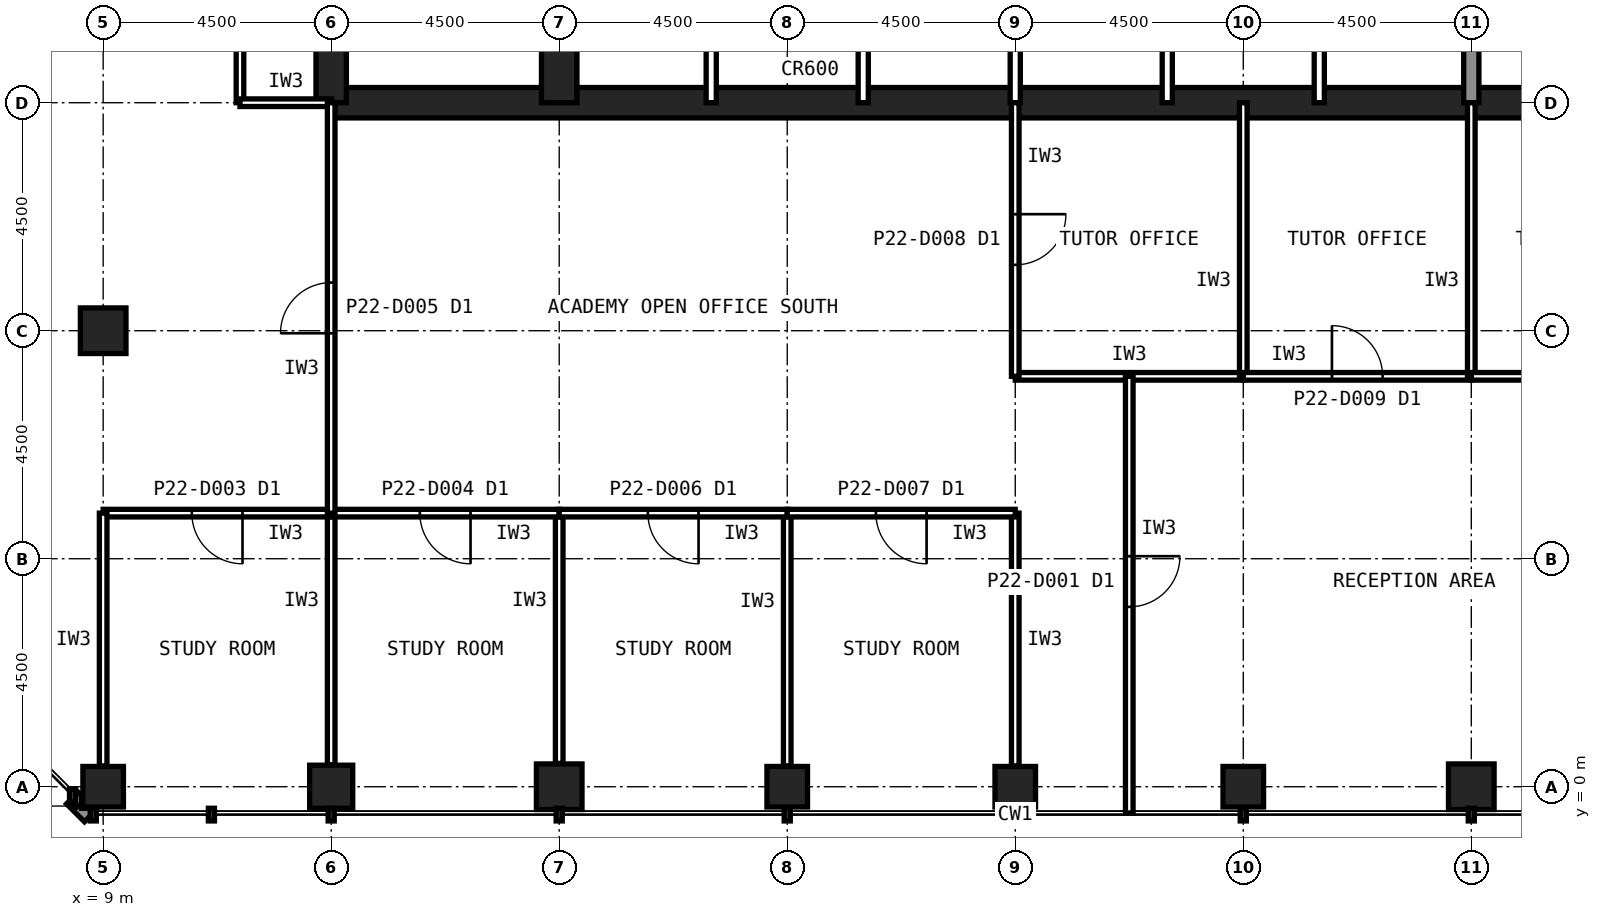
"""IFC4 building model, lengths in metres.
Left out: names, types, materials, properties, quantities, classifications, styles, units other than length and angle.
Written with IfcOpenShell. Run it as: python <this file> out.ifc"""

import sys

from ifc_helpers import new_model, si_unit, direction, frame, frame_2d, origin, origin_2d, place, context, subcontext, project, spatial, rectangle, hollow_rectangle, extrude, element, fill, save


model = new_model("IFC4")
c1 = context("Model", 3, precision=1e-05, world=origin(), true_north=direction((0.0, 1.0)))
c2 = subcontext(c1, "Body", "Model", "MODEL_VIEW")
j1 = project(units=[si_unit("LENGTHUNIT", "METRE"), si_unit("PLANEANGLEUNIT", "RADIAN")], contexts=[c1])
p1 = place(None, origin())
s1 = spatial("IfcSite", under=j1, at=p1, CompositionType="ELEMENT")
p2 = place(p1, origin())
s2 = spatial("IfcBuilding", under=s1, at=p2, CompositionType="ELEMENT")
p3 = place(p2, frame((0.0, 0.0, 96.2)))
s3 = spatial("IfcBuildingStorey", under=s2, at=p3, CompositionType="ELEMENT", Elevation=96.2)
p4 = place(p3, frame((9.0, 0.0, 0.0), z_axis=(0.0, 0.0, 1.0), x_axis=(1.0, 0.0, 0.0)))
e1 = element("IfcColumn", 1, at=p4, inside=s3, PredefinedType="COLUMN", context=c2, shape_type="SweptSolid", body=[
    extrude(hollow_rectangle(XDim=0.8, YDim=0.8, WallThickness=0.045, at=origin_2d()), origin(), (0.0, 0.0, 1.0), 4.2),
])
p5 = place(p3, frame((13.5, 0.0, 0.0), z_axis=(0.0, 0.0, 1.0), x_axis=(1.0, 0.0, 0.0)))
e2 = element("IfcColumn", 2, at=p5, inside=s3, PredefinedType="COLUMN", context=c2, shape_type="SweptSolid", body=[
    extrude(hollow_rectangle(XDim=0.85, YDim=0.85, WallThickness=0.05, at=origin_2d()), origin(), (0.0, 0.0, 1.0), 4.2),
])
p6 = place(p3, frame((18.0, 0.0, 0.0), z_axis=(0.0, 0.0, 1.0), x_axis=(1.0, 0.0, 0.0)))
e3 = element("IfcColumn", 3, at=p6, inside=s3, PredefinedType="COLUMN", context=c2, shape_type="SweptSolid", body=[
    extrude(hollow_rectangle(XDim=0.9, YDim=0.9, WallThickness=0.063, at=origin_2d()), origin(), (0.0, 0.0, 1.0), 4.2),
])
for number, where, z_axis, x_axis in (
    (4, (22.5, 0.0, 0.0), (0.0, 0.0, 1.0), (1.0, 0.0, 0.0)),
    (5, (27.0, 0.0, 0.0), (0.0, 0.0, 1.0), (1.0, 0.0, 0.0)),
    (6, (31.5, 0.0, 0.0), (0.0, 0.0, 1.0), (1.0, 0.0, 0.0)),
):
    element("IfcColumn", number, at=place(p3, frame(where, z_axis=z_axis, x_axis=x_axis)), inside=s3, PredefinedType="COLUMN", context=c2, shape_type="SweptSolid", body=[
        extrude(hollow_rectangle(XDim=0.8, YDim=0.8, WallThickness=0.045, at=origin_2d()), origin(), (0.0, 0.0, 1.0), 4.2),
    ])
for number, where, z_axis, x_axis in (
    (7, (36.0, 0.0, 0.0), (0.0, 0.0, 1.0), (1.0, 0.0, 0.0)),
    (8, (9.0, 9.0, 0.0), (0.0, 0.0, 1.0), (1.0, 0.0, 0.0)),
):
    element("IfcColumn", number, at=place(p3, frame(where, z_axis=z_axis, x_axis=x_axis)), inside=s3, PredefinedType="COLUMN", context=c2, shape_type="SweptSolid", body=[
        extrude(hollow_rectangle(XDim=0.9, YDim=0.9, WallThickness=0.063, at=origin_2d()), origin(), (0.0, 0.0, 1.0), 4.2),
    ])
p7 = place(p3, frame((13.5, 13.5, 0.0), z_axis=(0.0, 0.0, 1.0), x_axis=(1.0, 0.0, 0.0)))
e9 = element("IfcWall", 9, at=p7, inside=s3, PredefinedType="SHEAR", context=c2, shape_type="SweptSolid", body=[
    extrude(rectangle(XDim=27.0, YDim=0.6, at=frame_2d((13.5, 0.0))), origin(), (0.0, 0.0, 1.0), 4.2),
])
p8 = place(p3, frame((13.5, 40.5, 0.0), z_axis=(0.0, 0.0, 1.0), x_axis=(0.0, -1.0, 0.0)))
e10 = element("IfcWall", 10, at=p8, inside=s3, PredefinedType="SHEAR", context=c2, shape_type="SweptSolid", body=[
    extrude(rectangle(XDim=27.0, YDim=0.6, at=frame_2d((13.5, 0.0))), origin(), (0.0, 0.0, 1.0), 4.2),
])
p9 = place(p8, frame((19.65, 0.0, 0.0)))
e11 = element("IfcOpeningElement", 11, at=p9, cuts=e10, PredefinedType="OPENING", context=c2, shape_type="SweptSolid", body=[
    extrude(rectangle(XDim=1.2, YDim=2.1, at=frame_2d((0.6, 1.05))), frame((0.0, 0.31, 0.0), z_axis=(0.0, -1.0, 0.0), x_axis=(1.0, 0.0, 0.0)), (0.0, 0.0, 1.0), 0.62),
])
p10 = place(p8, frame((5.85, 0.0, 0.0)))
e12 = element("IfcOpeningElement", 12, at=p10, cuts=e10, PredefinedType="OPENING", context=c2, shape_type="SweptSolid", body=[
    extrude(rectangle(XDim=1.8, YDim=2.1, at=frame_2d((0.9, 1.05))), frame((0.0, 0.31, 0.0), z_axis=(0.0, -1.0, 0.0), x_axis=(1.0, 0.0, 0.0)), (0.0, 0.0, 1.0), 0.62),
])
p11 = place(p3, frame((18.0, 13.5, 0.0), z_axis=(0.0, 0.0, 1.0), x_axis=(0.0, 1.0, 0.0)))
e13 = element("IfcWall", 13, at=p11, inside=s3, PredefinedType="SHEAR", context=c2, shape_type="SweptSolid", body=[
    extrude(rectangle(XDim=18.0, YDim=0.7, at=frame_2d((9.0, 0.0))), origin(), (0.0, 0.0, 1.0), 4.2),
])
p12 = place(p3, frame((36.0, 13.5, 0.0), z_axis=(0.0, 0.0, 1.0), x_axis=(0.0, 1.0, 0.0)))
e14 = element("IfcWall", 14, at=p12, inside=s3, PredefinedType="SOLIDWALL", context=c2, shape_type="SweptSolid", body=[
    extrude(rectangle(XDim=4.5, YDim=0.3, at=frame_2d((2.25, 0.0))), origin(), (0.0, 0.0, 1.0), 4.04),
])
for number, where, z_axis, x_axis in (
    (15, (21.0, 13.5, 0.0), (0.0, 0.0, 1.0), (0.0, 1.0, 0.0)),
    (16, (24.0, 13.5, 0.0), (0.0, 0.0, 1.0), (0.0, 1.0, 0.0)),
    (17, (27.0, 13.5, 0.0), (0.0, 0.0, 1.0), (0.0, 1.0, 0.0)),
    (18, (30.0, 13.5, 0.0), (0.0, 0.0, 1.0), (0.0, 1.0, 0.0)),
    (19, (33.0, 13.5, 0.0), (0.0, 0.0, 1.0), (0.0, 1.0, 0.0)),
):
    element("IfcWall", number, at=place(p3, frame(where, z_axis=z_axis, x_axis=x_axis)), inside=s3, PredefinedType="PARTITIONING", context=c2, shape_type="SweptSolid", body=[
        extrude(rectangle(XDim=4.5, YDim=0.2, at=frame_2d((2.25, 0.0))), origin(), (0.0, 0.0, 1.0), 4.04),
    ])
p13 = place(p3, frame((11.7, 20.7, 0.0), z_axis=(0.0, 0.0, 1.0), x_axis=(0.0, -1.0, 0.0)))
e20 = element("IfcWall", 20, at=p13, inside=s3, PredefinedType="PARTITIONING", context=c2, shape_type="SweptSolid", body=[
    extrude(rectangle(XDim=7.2, YDim=0.15, at=frame_2d((3.6, 0.0))), origin(), (0.0, 0.0, 1.0), 4.04),
])
p14 = place(p3, frame((11.7, 13.5, 0.0), z_axis=(0.0, 0.0, 1.0), x_axis=(1.0, 0.0, 0.0)))
e21 = element("IfcWall", 21, at=p14, inside=s3, PredefinedType="PARTITIONING", context=c2, shape_type="SweptSolid", body=[
    extrude(rectangle(XDim=1.81, YDim=0.15, at=frame_2d((0.905, 0.0))), origin(), (0.0, 0.0, 1.0), 3.189),
])
p15 = place(p3, frame((13.5, 0.435, 0.0), z_axis=(0.0, 0.0, 1.0), x_axis=(0.0, 1.0, 0.0)))
e22 = element("IfcWall", 22, at=p15, inside=s3, PredefinedType="PARTITIONING", context=c2, shape_type="SweptSolid", body=[
    extrude(rectangle(XDim=4.965, YDim=0.15, at=frame_2d((2.482, 0.0))), origin(), (0.0, 0.0, 1.0), 3.189),
])
p16 = place(p3, frame((13.5, 5.4, 0.0), z_axis=(0.0, 0.0, 1.0), x_axis=(-1.0, 0.0, 0.0)))
e23 = element("IfcWall", 23, at=p16, inside=s3, PredefinedType="PARTITIONING", context=c2, shape_type="SweptSolid", body=[
    extrude(rectangle(XDim=4.5, YDim=0.15, at=frame_2d((2.25, 0.0))), origin(), (0.0, 0.0, 1.0), 4.04),
])
p17 = place(p16, frame((1.75, 0.0, 0.0)))
e24 = element("IfcOpeningElement", 24, at=p17, cuts=e23, PredefinedType="OPENING", context=c2, shape_type="SweptSolid", body=[
    extrude(rectangle(XDim=1.0, YDim=2.1, at=frame_2d((0.5, 1.05))), frame((0.0, 0.085, 0.0), z_axis=(0.0, -1.0, 0.0), x_axis=(1.0, 0.0, 0.0)), (0.0, 0.0, 1.0), 0.17),
])
p18 = place(p3, frame((9.0, 5.4, 0.0), z_axis=(0.0, 0.0, 1.0), x_axis=(0.0, -1.0, 0.0)))
e25 = element("IfcWall", 25, at=p18, inside=s3, PredefinedType="PARTITIONING", context=c2, shape_type="SweptSolid", body=[
    extrude(rectangle(XDim=4.99, YDim=0.15, at=frame_2d((2.495, 0.0))), origin(), (0.0, 0.0, 1.0), 3.429),
])
p19 = place(p3, frame((18.0, 0.46, 0.0), z_axis=(0.0, 0.0, 1.0), x_axis=(0.0, 1.0, 0.0)))
e26 = element("IfcWall", 26, at=p19, inside=s3, PredefinedType="PARTITIONING", context=c2, shape_type="SweptSolid", body=[
    extrude(rectangle(XDim=4.94, YDim=0.15, at=frame_2d((2.47, 0.0))), origin(), (0.0, 0.0, 1.0), 3.189),
])
p20 = place(p3, frame((18.0, 5.4, 0.0), z_axis=(0.0, 0.0, 1.0), x_axis=(-1.0, 0.0, 0.0)))
e27 = element("IfcWall", 27, at=p20, inside=s3, PredefinedType="PARTITIONING", context=c2, shape_type="SweptSolid", body=[
    extrude(rectangle(XDim=4.5, YDim=0.15, at=frame_2d((2.25, 0.0))), origin(), (0.0, 0.0, 1.0), 4.04),
])
p21 = place(p20, frame((1.75, 0.0, 0.0)))
e28 = element("IfcOpeningElement", 28, at=p21, cuts=e27, PredefinedType="OPENING", context=c2, shape_type="SweptSolid", body=[
    extrude(rectangle(XDim=1.0, YDim=2.1, at=frame_2d((0.5, 1.05))), frame((0.0, 0.085, 0.0), z_axis=(0.0, -1.0, 0.0), x_axis=(1.0, 0.0, 0.0)), (0.0, 0.0, 1.0), 0.17),
])
p22 = place(p3, frame((22.5, 0.41, 0.0), z_axis=(0.0, 0.0, 1.0), x_axis=(0.0, 1.0, 0.0)))
e29 = element("IfcWall", 29, at=p22, inside=s3, PredefinedType="PARTITIONING", context=c2, shape_type="SweptSolid", body=[
    extrude(rectangle(XDim=4.99, YDim=0.15, at=frame_2d((2.495, 0.0))), origin(), (0.0, 0.0, 1.0), 3.189),
])
p23 = place(p3, frame((22.5, 5.4, 0.0), z_axis=(0.0, 0.0, 1.0), x_axis=(-1.0, 0.0, 0.0)))
e30 = element("IfcWall", 30, at=p23, inside=s3, PredefinedType="PARTITIONING", context=c2, shape_type="SweptSolid", body=[
    extrude(rectangle(XDim=4.5, YDim=0.15, at=frame_2d((2.25, 0.0))), origin(), (0.0, 0.0, 1.0), 4.04),
])
p24 = place(p23, frame((1.75, 0.0, 0.0)))
e31 = element("IfcOpeningElement", 31, at=p24, cuts=e30, PredefinedType="OPENING", context=c2, shape_type="SweptSolid", body=[
    extrude(rectangle(XDim=1.0, YDim=2.1, at=frame_2d((0.5, 1.05))), frame((0.0, 0.085, 0.0), z_axis=(0.0, -1.0, 0.0), x_axis=(1.0, 0.0, 0.0)), (0.0, 0.0, 1.0), 0.17),
])
p25 = place(p3, frame((27.0, 0.41, 0.0), z_axis=(0.0, 0.0, 1.0), x_axis=(0.0, 1.0, 0.0)))
e32 = element("IfcWall", 32, at=p25, inside=s3, PredefinedType="PARTITIONING", context=c2, shape_type="SweptSolid", body=[
    extrude(rectangle(XDim=4.99, YDim=0.15, at=frame_2d((2.495, 0.0))), origin(), (0.0, 0.0, 1.0), 3.189),
])
p26 = place(p3, frame((27.0, 5.4, 0.0), z_axis=(0.0, 0.0, 1.0), x_axis=(-1.0, 0.0, 0.0)))
e33 = element("IfcWall", 33, at=p26, inside=s3, PredefinedType="PARTITIONING", context=c2, shape_type="SweptSolid", body=[
    extrude(rectangle(XDim=4.5, YDim=0.15, at=frame_2d((2.25, 0.0))), origin(), (0.0, 0.0, 1.0), 4.04),
])
p27 = place(p26, frame((1.75, 0.0, 0.0)))
e34 = element("IfcOpeningElement", 34, at=p27, cuts=e33, PredefinedType="OPENING", context=c2, shape_type="SweptSolid", body=[
    extrude(rectangle(XDim=1.0, YDim=2.1, at=frame_2d((0.5, 1.05))), frame((0.0, 0.085, 0.0), z_axis=(0.0, -1.0, 0.0), x_axis=(1.0, 0.0, 0.0)), (0.0, 0.0, 1.0), 0.17),
])
p28 = place(p3, frame((27.0, 8.1, 0.0), z_axis=(0.0, 0.0, 1.0), x_axis=(1.0, 0.0, 0.0)))
e35 = element("IfcWall", 35, at=p28, inside=s3, PredefinedType="PARTITIONING", context=c2, shape_type="SweptSolid", body=[
    extrude(rectangle(XDim=4.5, YDim=0.15, at=frame_2d((2.25, 0.0))), origin(), (0.0, 0.0, 1.0), 4.04),
])
p29 = place(p3, frame((31.5, 8.1, 0.0), z_axis=(0.0, 0.0, 1.0), x_axis=(0.0, 1.0, 0.0)))
e36 = element("IfcWall", 36, at=p29, inside=s3, PredefinedType="PARTITIONING", context=c2, shape_type="SweptSolid", body=[
    extrude(rectangle(XDim=5.4, YDim=0.15, at=frame_2d((2.7, 0.0))), origin(), (0.0, 0.0, 1.0), 3.189),
])
p30 = place(p3, frame((27.0, 13.5, 0.0), z_axis=(0.0, 0.0, 1.0), x_axis=(0.0, -1.0, 0.0)))
e37 = element("IfcWall", 37, at=p30, inside=s3, PredefinedType="PARTITIONING", context=c2, shape_type="SweptSolid", body=[
    extrude(rectangle(XDim=5.4, YDim=0.15, at=frame_2d((2.7, 0.0))), origin(), (0.0, 0.0, 1.0), 3.189),
])
p31 = place(p30, frame((2.2, 0.0, 0.0)))
e38 = element("IfcOpeningElement", 38, at=p31, cuts=e37, PredefinedType="OPENING", context=c2, shape_type="SweptSolid", body=[
    extrude(rectangle(XDim=1.0, YDim=2.1, at=frame_2d((0.5, 1.05))), frame((0.0, 0.085, 0.0), z_axis=(0.0, -1.0, 0.0), x_axis=(1.0, 0.0, 0.0)), (0.0, 0.0, 1.0), 0.17),
])
p32 = place(p3, frame((31.5, 8.1, 0.0), z_axis=(0.0, 0.0, 1.0), x_axis=(1.0, 0.0, 0.0)))
e39 = element("IfcWall", 39, at=p32, inside=s3, PredefinedType="PARTITIONING", context=c2, shape_type="SweptSolid", body=[
    extrude(rectangle(XDim=4.5, YDim=0.15, at=frame_2d((2.25, 0.0))), origin(), (0.0, 0.0, 1.0), 4.04),
])
p33 = place(p32, frame((1.75, 0.0, 0.0)))
e40 = element("IfcOpeningElement", 40, at=p33, cuts=e39, PredefinedType="OPENING", context=c2, shape_type="SweptSolid", body=[
    extrude(rectangle(XDim=1.0, YDim=2.1, at=frame_2d((0.5, 1.05))), frame((0.0, 0.085, 0.0), z_axis=(0.0, -1.0, 0.0), x_axis=(1.0, 0.0, 0.0)), (0.0, 0.0, 1.0), 0.17),
])
p34 = place(p3, frame((36.0, 8.1, 0.0), z_axis=(0.0, 0.0, 1.0), x_axis=(0.0, 1.0, 0.0)))
e41 = element("IfcWall", 41, at=p34, inside=s3, PredefinedType="PARTITIONING", context=c2, shape_type="SweptSolid", body=[
    extrude(rectangle(XDim=5.4, YDim=0.15, at=frame_2d((2.7, 0.0))), origin(), (0.0, 0.0, 1.0), 3.189),
])
p35 = place(p3, frame((36.0, 8.1, 0.0), z_axis=(0.0, 0.0, 1.0), x_axis=(1.0, 0.0, 0.0)))
e42 = element("IfcWall", 42, at=p35, inside=s3, PredefinedType="PARTITIONING", context=c2, shape_type="SweptSolid", body=[
    extrude(rectangle(XDim=4.5, YDim=0.15, at=frame_2d((2.25, 0.0))), origin(), (0.0, 0.0, 1.0), 4.04),
])
p36 = place(p3, frame((29.25, 8.1, 0.0), z_axis=(0.0, 0.0, 1.0), x_axis=(0.0, -1.0, 0.0)))
e43 = element("IfcWall", 43, at=p36, inside=s3, PredefinedType="PARTITIONING", context=c2, shape_type="SweptSolid", body=[
    extrude(rectangle(XDim=8.62, YDim=0.15, at=frame_2d((4.31, 0.0))), origin(), (0.0, 0.0, 1.0), 4.04),
])
p37 = place(p36, frame((3.55, 0.0, 0.0)))
e44 = element("IfcOpeningElement", 44, at=p37, cuts=e43, PredefinedType="OPENING", context=c2, shape_type="SweptSolid", body=[
    extrude(rectangle(XDim=1.0, YDim=2.1, at=frame_2d((0.5, 1.05))), frame((0.0, 0.085, 0.0), z_axis=(0.0, -1.0, 0.0), x_axis=(1.0, 0.0, 0.0)), (0.0, 0.0, 1.0), 0.17),
])
p38 = place(p3, frame((13.5, 5.4, 0.0), z_axis=(0.0, 0.0, 1.0), x_axis=(0.0, 1.0, 0.0)))
e45 = element("IfcWall", 45, at=p38, inside=s3, PredefinedType="PARTITIONING", context=c2, shape_type="SweptSolid", body=[
    extrude(rectangle(XDim=8.1, YDim=0.15, at=frame_2d((4.05, 0.0))), origin(), (0.0, 0.0, 1.0), 3.189),
])
p39 = place(p38, frame((3.55, 0.0, 0.0)))
e46 = element("IfcOpeningElement", 46, at=p39, cuts=e45, PredefinedType="OPENING", context=c2, shape_type="SweptSolid", body=[
    extrude(rectangle(XDim=1.0, YDim=2.1, at=frame_2d((0.5, 1.05))), frame((0.0, 0.085, 0.0), z_axis=(0.0, -1.0, 0.0), x_axis=(1.0, 0.0, 0.0)), (0.0, 0.0, 1.0), 0.17),
])
p40 = place(p17, origin())
e47 = element("IfcDoor", 47, at=p40, inside=s3, OperationType="SINGLE_SWING_LEFT", PredefinedType="DOOR", context=c2, shape_type="SweptSolid", body=[
    extrude(rectangle(XDim=1.0, YDim=2.1, at=frame_2d((0.5, 1.05))), frame((0.0, 0.025, 0.0), z_axis=(0.0, -1.0, 0.0), x_axis=(1.0, 0.0, 0.0)), (0.0, 0.0, 1.0), 0.05),
])
fill(e24, e47)
p41 = place(p21, origin())
e48 = element("IfcDoor", 48, at=p41, inside=s3, OperationType="SINGLE_SWING_LEFT", PredefinedType="DOOR", context=c2, shape_type="SweptSolid", body=[
    extrude(rectangle(XDim=1.0, YDim=2.1, at=frame_2d((0.5, 1.05))), frame((0.0, 0.025, 0.0), z_axis=(0.0, -1.0, 0.0), x_axis=(1.0, 0.0, 0.0)), (0.0, 0.0, 1.0), 0.05),
])
fill(e28, e48)
p42 = place(p24, origin())
e49 = element("IfcDoor", 49, at=p42, inside=s3, OperationType="SINGLE_SWING_LEFT", PredefinedType="DOOR", context=c2, shape_type="SweptSolid", body=[
    extrude(rectangle(XDim=1.0, YDim=2.1, at=frame_2d((0.5, 1.05))), frame((0.0, 0.025, 0.0), z_axis=(0.0, -1.0, 0.0), x_axis=(1.0, 0.0, 0.0)), (0.0, 0.0, 1.0), 0.05),
])
fill(e31, e49)
p43 = place(p27, origin())
e50 = element("IfcDoor", 50, at=p43, inside=s3, OperationType="SINGLE_SWING_LEFT", PredefinedType="DOOR", context=c2, shape_type="SweptSolid", body=[
    extrude(rectangle(XDim=1.0, YDim=2.1, at=frame_2d((0.5, 1.05))), frame((0.0, 0.025, 0.0), z_axis=(0.0, -1.0, 0.0), x_axis=(1.0, 0.0, 0.0)), (0.0, 0.0, 1.0), 0.05),
])
fill(e34, e50)
p44 = place(p31, origin())
e51 = element("IfcDoor", 51, at=p44, inside=s3, OperationType="SINGLE_SWING_LEFT", PredefinedType="DOOR", context=c2, shape_type="SweptSolid", body=[
    extrude(rectangle(XDim=1.0, YDim=2.1, at=frame_2d((0.5, 1.05))), frame((0.0, 0.025, 0.0), z_axis=(0.0, -1.0, 0.0), x_axis=(1.0, 0.0, 0.0)), (0.0, 0.0, 1.0), 0.05),
])
fill(e38, e51)
p45 = place(p33, origin())
e52 = element("IfcDoor", 52, at=p45, inside=s3, OperationType="SINGLE_SWING_LEFT", PredefinedType="DOOR", context=c2, shape_type="SweptSolid", body=[
    extrude(rectangle(XDim=1.0, YDim=2.1, at=frame_2d((0.5, 1.05))), frame((0.0, 0.025, 0.0), z_axis=(0.0, -1.0, 0.0), x_axis=(1.0, 0.0, 0.0)), (0.0, 0.0, 1.0), 0.05),
])
fill(e40, e52)
p46 = place(p37, origin())
e53 = element("IfcDoor", 53, at=p46, inside=s3, OperationType="SINGLE_SWING_LEFT", PredefinedType="DOOR", context=c2, shape_type="SweptSolid", body=[
    extrude(rectangle(XDim=1.0, YDim=2.1, at=frame_2d((0.5, 1.05))), frame((0.0, 0.025, 0.0), z_axis=(0.0, -1.0, 0.0), x_axis=(1.0, 0.0, 0.0)), (0.0, 0.0, 1.0), 0.05),
])
fill(e44, e53)
p47 = place(p39, origin())
e54 = element("IfcDoor", 54, at=p47, inside=s3, OperationType="SINGLE_SWING_LEFT", PredefinedType="DOOR", context=c2, shape_type="SweptSolid", body=[
    extrude(rectangle(XDim=1.0, YDim=2.1, at=frame_2d((0.5, 1.05))), frame((0.0, 0.025, 0.0), z_axis=(0.0, -1.0, 0.0), x_axis=(1.0, 0.0, 0.0)), (0.0, 0.0, 1.0), 0.05),
])
fill(e46, e54)
save(model, sys.argv[1])
